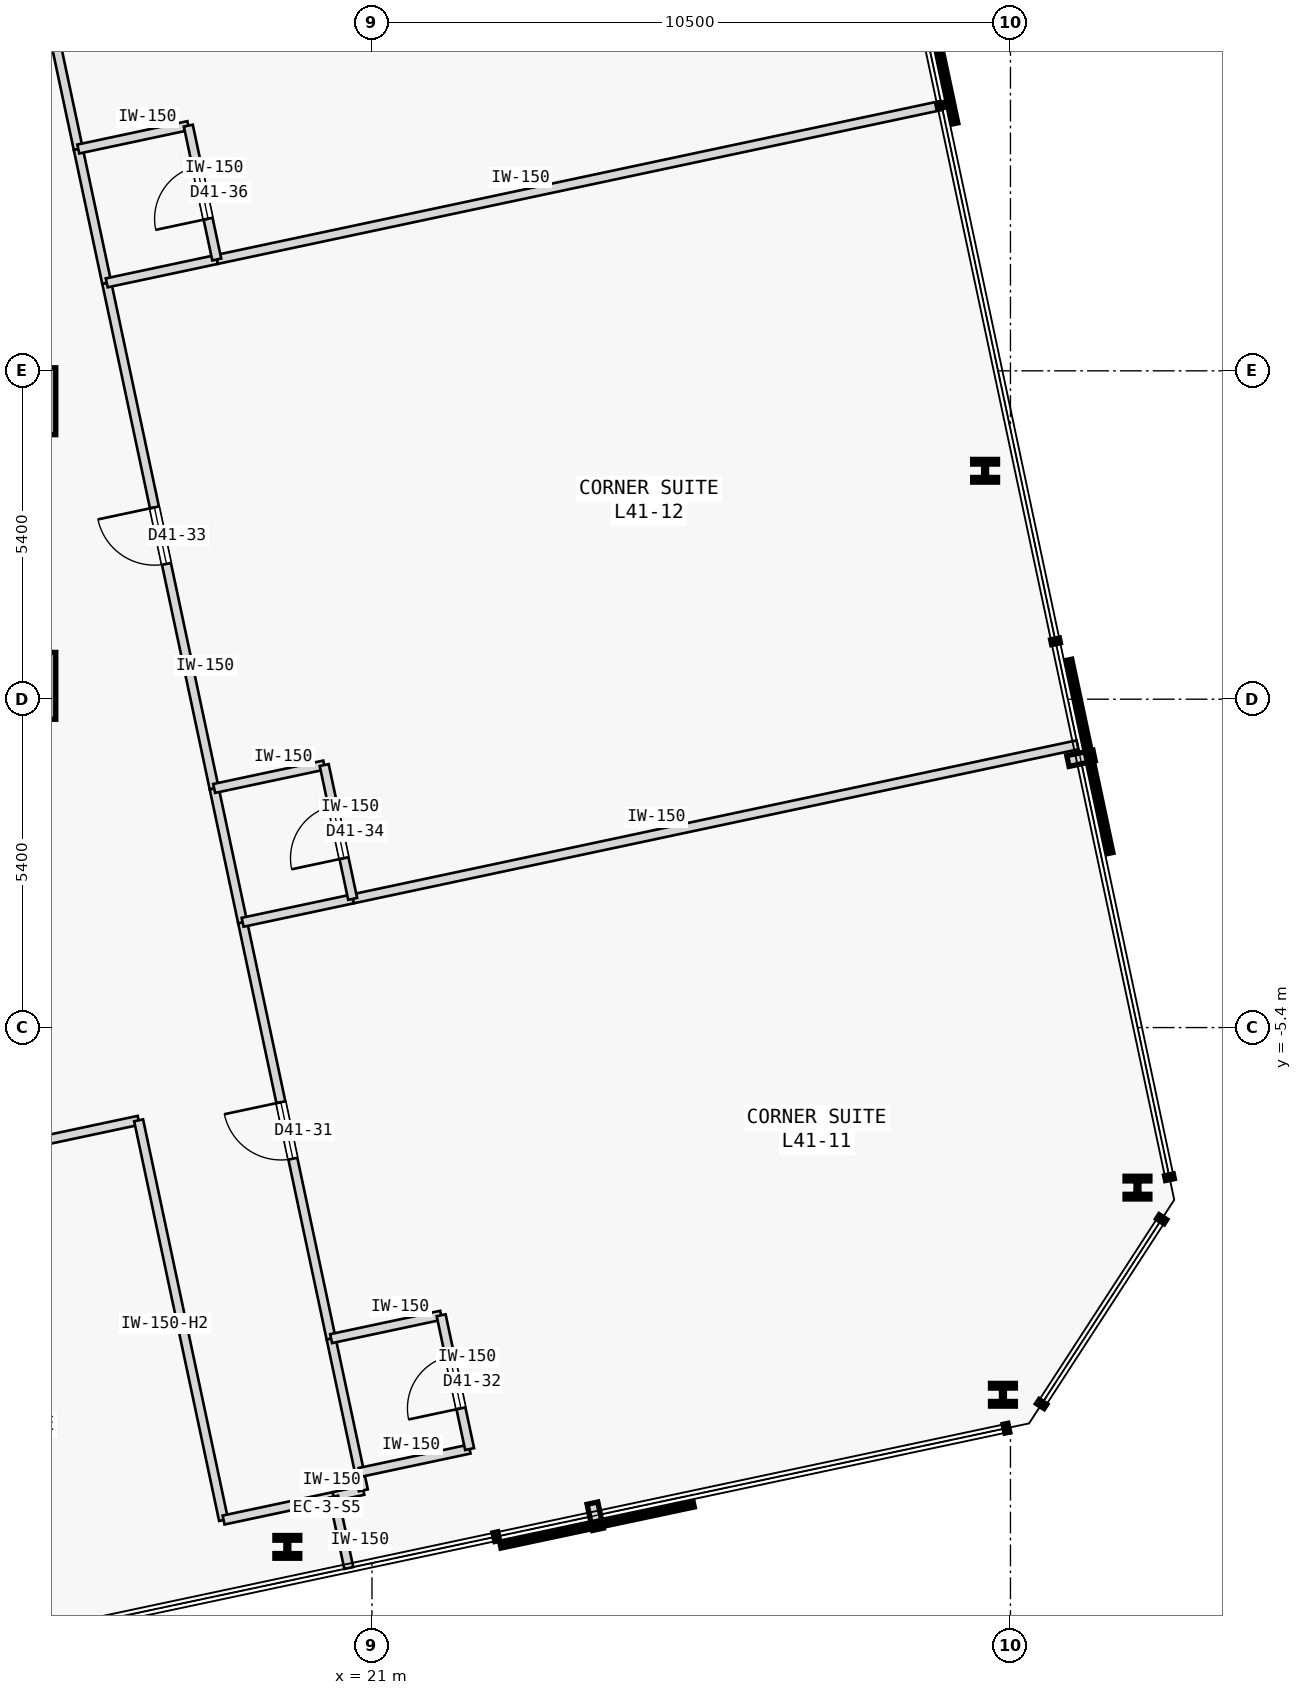
"""IFC4 building model, lengths in metres.
Left out: names, types, materials, properties, quantities, classifications, styles, units other than length and angle.
Written with IfcOpenShell. Run it as: python <this file> out.ifc"""

import sys

from ifc_helpers import new_model, si_unit, direction, frame, frame_2d, origin, origin_2d, place, context, subcontext, project, spatial, rectangle, i_section, extrude, element, fill, save


model = new_model("IFC4")
c1 = context("Model", 3, precision=1e-05, world=origin(), true_north=direction((0.0, 1.0)))
c2 = subcontext(c1, "Body", "Model", "MODEL_VIEW")
j1 = project(units=[si_unit("LENGTHUNIT", "METRE"), si_unit("PLANEANGLEUNIT", "RADIAN")], contexts=[c1])
p1 = place(None, origin())
s1 = spatial("IfcSite", under=j1, at=p1, CompositionType="ELEMENT")
p2 = place(p1, origin())
s2 = spatial("IfcBuilding", under=s1, at=p2, CompositionType="ELEMENT")
p3 = place(p2, frame((0.0, 0.0, 161.6)))
s3 = spatial("IfcBuildingStorey", under=s2, at=p3, CompositionType="ELEMENT", Elevation=161.6)
for number, where, z_axis, x_axis in (
    (1, (15.25, 4.9, 0.0), (0.0, 0.0, 1.0), (1.0, 0.0, 0.0)),
    (2, (15.25, 0.22, 0.0), (0.0, 0.0, 1.0), (1.0, 0.0, 0.0)),
):
    element("IfcColumn", number, at=place(p3, frame(where, z_axis=z_axis, x_axis=x_axis)), inside=s3, PredefinedType="COLUMN", context=c2, shape_type="SweptSolid", body=[
        extrude(rectangle(XDim=1.1, YDim=1.1, at=origin_2d()), origin(), (0.0, 0.0, 1.0), 3.4),
    ])
for number, where, z_axis, x_axis in (
    (3, (19.608, -13.94, 0.0), (0.0, 0.0, 1.0), (1.0, 0.0, 0.0)),
    (4, (31.376, -11.439, 0.0), (0.0, 0.0, 1.0), (1.0, 0.0, 0.0)),
    (5, (33.589, -8.032, 0.0), (0.0, 0.0, 1.0), (1.0, 0.0, 0.0)),
    (6, (31.083, 3.756, 0.0), (0.0, 0.0, 1.0), (1.0, 0.0, 0.0)),
):
    element("IfcColumn", number, at=place(p3, frame(where, z_axis=z_axis, x_axis=x_axis)), inside=s3, PredefinedType="COLUMN", context=c2, shape_type="SweptSolid", body=[
        extrude(i_section(OverallWidth=0.409, OverallDepth=0.374, WebThickness=0.048, FlangeThickness=0.077, FilletRadius=0.015, at=origin_2d()), origin(), (0.0, 0.0, 1.0), 3.4),
    ])
p4 = place(p3, frame((8.964, -8.668, 0.0), z_axis=(0.0, 0.0, 1.0), x_axis=(0.978149300771, 0.20790369261, 0.0)))
e7 = element("IfcWall", 7, at=p4, inside=s3, PredefinedType="PARTITIONING", context=c2, shape_type="SweptSolid", body=[
    extrude(rectangle(XDim=8.382, YDim=0.15, at=frame_2d((4.191, 0.0))), origin(), (0.0, 0.0, 1.0), 3.175),
])
p5 = place(p4, frame((3.731, 0.0, 0.0)))
e8 = element("IfcOpeningElement", 8, at=p5, cuts=e7, PredefinedType="OPENING", context=c2, shape_type="SweptSolid", body=[
    extrude(rectangle(XDim=0.92, YDim=2.15, at=frame_2d((0.46, 1.075))), frame((0.0, 0.085, 0.0), z_axis=(0.0, -1.0, 0.0), x_axis=(1.0, 0.0, 0.0)), (0.0, 0.0, 1.0), 0.17),
])
p6 = place(p3, frame((18.56, -13.498, 0.0), z_axis=(0.0, 0.0, 1.0), x_axis=(-0.207888737749, 0.978152479278, 0.0)))
e9 = element("IfcWall", 9, at=p6, inside=s3, PredefinedType="PARTITIONING", context=c2, shape_type="SweptSolid", body=[
    extrude(rectangle(XDim=6.72, YDim=0.15, at=frame_2d((3.36, 0.0))), origin(), (0.0, 0.0, 1.0), 2.575),
])
p7 = place(p3, frame((18.56, -13.498, 0.0), z_axis=(0.0, 0.0, 1.0), x_axis=(0.978160192495, 0.207852442415, 0.0)))
e10 = element("IfcWall", 10, at=p7, inside=s3, PredefinedType="PARTITIONING", context=c2, shape_type="SweptSolid", body=[
    extrude(rectangle(XDim=1.85, YDim=0.15, at=frame_2d((0.925, 0.0))), origin(), (0.0, 0.0, 1.0), 3.175),
])
p8 = place(p3, frame((20.369, -13.114, 0.0), z_axis=(0.0, 0.0, 1.0), x_axis=(0.978143962546, 0.207928806409, 0.0)))
e11 = element("IfcWall", 11, at=p8, inside=s3, PredefinedType="PARTITIONING", context=c2, shape_type="SweptSolid", body=[
    extrude(rectangle(XDim=0.5, YDim=0.15, at=frame_2d((0.25, 0.0))), origin(), (0.0, 0.0, 1.0), 3.175),
])
p9 = place(p3, frame((20.858, -13.01, 0.0), z_axis=(0.0, 0.0, 1.0), x_axis=(-0.208306395052, 0.978063620518, 0.0)))
e12 = element("IfcWall", 12, at=p9, inside=s3, PredefinedType="PARTITIONING", context=c2, shape_type="SweptSolid", body=[
    extrude(rectangle(XDim=0.3, YDim=0.15, at=frame_2d((0.15, 0.0))), origin(), (0.0, 0.0, 1.0), 3.175),
])
p10 = place(p3, frame((20.328, -10.515, 0.0), z_axis=(0.0, 0.0, 1.0), x_axis=(-0.207906726269, 0.978148655968, 0.0)))
e13 = element("IfcWall", 13, at=p10, inside=s3, PredefinedType="PARTITIONING", context=c2, shape_type="SweptSolid", body=[
    extrude(rectangle(XDim=7.0, YDim=0.15, at=frame_2d((3.5, 0.0))), origin(), (0.0, 0.0, 1.0), 3.175),
])
p11 = place(p10, frame((3.025, 0.0, 0.0)))
e14 = element("IfcOpeningElement", 14, at=p11, cuts=e13, PredefinedType="OPENING", context=c2, shape_type="SweptSolid", body=[
    extrude(rectangle(XDim=0.95, YDim=2.15, at=frame_2d((0.475, 1.075))), frame((0.0, 0.085, 0.0), z_axis=(0.0, -1.0, 0.0), x_axis=(1.0, 0.0, 0.0)), (0.0, 0.0, 1.0), 0.17),
])
p12 = place(p3, frame((20.796, -12.716, 0.0), z_axis=(0.0, 0.0, 1.0), x_axis=(-0.207891197838, 0.978151956427, 0.0)))
e15 = element("IfcWall", 15, at=p12, inside=s3, PredefinedType="PARTITIONING", context=c2, shape_type="SweptSolid", body=[
    extrude(rectangle(XDim=2.25, YDim=0.15, at=frame_2d((1.125, 0.0))), origin(), (0.0, 0.0, 1.0), 3.175),
])
p13 = place(p3, frame((18.405, -1.468, 0.0), z_axis=(0.0, 0.0, 1.0), x_axis=(-0.207888984761, 0.97815242678, 0.0)))
e16 = element("IfcWall", 16, at=p13, inside=s3, PredefinedType="PARTITIONING", context=c2, shape_type="SweptSolid", body=[
    extrude(rectangle(XDim=8.5, YDim=0.15, at=frame_2d((4.25, 0.0))), origin(), (0.0, 0.0, 1.0), 3.175),
])
p14 = place(p13, frame((3.775, 0.0, 0.0)))
e17 = element("IfcOpeningElement", 17, at=p14, cuts=e16, PredefinedType="OPENING", context=c2, shape_type="SweptSolid", body=[
    extrude(rectangle(XDim=0.95, YDim=2.15, at=frame_2d((0.475, 1.075))), frame((0.0, 0.085, 0.0), z_axis=(0.0, -1.0, 0.0), x_axis=(1.0, 0.0, 0.0)), (0.0, 0.0, 1.0), 0.17),
])
p15 = place(p3, frame((18.873, -3.668, 0.0), z_axis=(0.0, 0.0, 1.0), x_axis=(-0.208017083936, 0.9781251928, 0.0)))
e18 = element("IfcWall", 18, at=p15, inside=s3, PredefinedType="PARTITIONING", context=c2, shape_type="SweptSolid", body=[
    extrude(rectangle(XDim=2.25, YDim=0.15, at=frame_2d((1.125, 0.0))), origin(), (0.0, 0.0, 1.0), 3.175),
])
p16 = place(p3, frame((16.17, 9.047, 0.0), z_axis=(0.0, 0.0, 1.0), x_axis=(-0.2079164651, 0.978146585917, 0.0)))
e19 = element("IfcWall", 19, at=p16, inside=s3, PredefinedType="PARTITIONING", context=c2, shape_type="SweptSolid", body=[
    extrude(rectangle(XDim=8.5, YDim=0.15, at=frame_2d((4.25, 0.0))), origin(), (0.0, 0.0, 1.0), 3.175),
])
p17 = place(p16, frame((3.775, 0.0, 0.0)))
e20 = element("IfcOpeningElement", 20, at=p17, cuts=e19, PredefinedType="OPENING", context=c2, shape_type="SweptSolid", body=[
    extrude(rectangle(XDim=0.95, YDim=2.15, at=frame_2d((0.475, 1.075))), frame((0.0, 0.085, 0.0), z_axis=(0.0, -1.0, 0.0), x_axis=(1.0, 0.0, 0.0)), (0.0, 0.0, 1.0), 0.17),
])
p18 = place(p3, frame((16.638, 6.847, 0.0), z_axis=(0.0, 0.0, 1.0), x_axis=(-0.207913264065, 0.978147266328, 0.0)))
e21 = element("IfcWall", 21, at=p18, inside=s3, PredefinedType="PARTITIONING", context=c2, shape_type="SweptSolid", body=[
    extrude(rectangle(XDim=2.25, YDim=0.15, at=frame_2d((1.125, 0.0))), origin(), (0.0, 0.0, 1.0), 3.175),
])
p19 = place(p3, frame((20.619, -14.288, 0.0), z_axis=(0.0, 0.0, 1.0), x_axis=(-0.207917150959, 0.978146440129, 0.0)))
e22 = element("IfcWall", 22, at=p19, inside=s3, PredefinedType="PARTITIONING", context=c2, shape_type="SweptSolid", body=[
    extrude(rectangle(XDim=1.2, YDim=0.15, at=frame_2d((0.6, 0.0))), origin(), (0.0, 0.0, 1.0), 3.175),
])
for number, where, z_axis, x_axis in (
    (23, (20.796, -12.716, 0.0), (0.0, 0.0, 1.0), (0.978, 0.208, 0.0)),
    (24, (20.328, -10.515, 0.0), (0.0, 0.0, 1.0), (0.978, 0.208, 0.0)),
):
    element("IfcWall", number, at=place(p3, frame(where, z_axis=z_axis, x_axis=x_axis)), inside=s3, PredefinedType="PARTITIONING", context=c2, shape_type="SweptSolid", body=[
        extrude(rectangle(XDim=1.85, YDim=0.15, at=frame_2d((0.925, 0.0))), origin(), (0.0, 0.0, 1.0), 3.175),
    ])
p20 = place(p3, frame((22.605, -12.332, 0.0), z_axis=(0.0, 0.0, 1.0), x_axis=(-0.207891197838, 0.978151956427, 0.0)))
e25 = element("IfcWall", 25, at=p20, inside=s3, PredefinedType="PARTITIONING", context=c2, shape_type="SweptSolid", body=[
    extrude(rectangle(XDim=2.25, YDim=0.15, at=frame_2d((1.125, 0.0))), origin(), (0.0, 0.0, 1.0), 3.175),
])
p21 = place(p20, frame((0.685, 0.0, 0.0)))
e26 = element("IfcOpeningElement", 26, at=p21, cuts=e25, PredefinedType="OPENING", context=c2, shape_type="SweptSolid", body=[
    extrude(rectangle(XDim=0.88, YDim=2.15, at=frame_2d((0.44, 1.075))), frame((0.0, 0.085, 0.0), z_axis=(0.0, -1.0, 0.0), x_axis=(1.0, 0.0, 0.0)), (0.0, 0.0, 1.0), 0.17),
])
p22 = place(p3, frame((20.682, -3.284, 0.0), z_axis=(0.0, 0.0, 1.0), x_axis=(0.97814556055, 0.207921288896, 0.0)))
e27 = element("IfcWall", 27, at=p22, inside=s3, PredefinedType="PARTITIONING", context=c2, shape_type="SweptSolid", body=[
    extrude(rectangle(XDim=12.187, YDim=0.15, at=frame_2d((6.094, 0.0))), origin(), (0.0, 0.0, 1.0), 3.175),
])
p23 = place(p3, frame((18.873, -3.668, 0.0), z_axis=(0.0, 0.0, 1.0), x_axis=(0.978160192495, 0.207852442415, 0.0)))
e28 = element("IfcWall", 28, at=p23, inside=s3, PredefinedType="PARTITIONING", context=c2, shape_type="SweptSolid", body=[
    extrude(rectangle(XDim=1.85, YDim=0.15, at=frame_2d((0.925, 0.0))), origin(), (0.0, 0.0, 1.0), 3.175),
])
p24 = place(p3, frame((18.405, -1.468, 0.0), z_axis=(0.0, 0.0, 1.0), x_axis=(0.978139061018, 0.207951862966, 0.0)))
e29 = element("IfcWall", 29, at=p24, inside=s3, PredefinedType="PARTITIONING", context=c2, shape_type="SweptSolid", body=[
    extrude(rectangle(XDim=1.85, YDim=0.15, at=frame_2d((0.925, 0.0))), origin(), (0.0, 0.0, 1.0), 3.175),
])
p25 = place(p3, frame((20.682, -3.284, 0.0), z_axis=(0.0, 0.0, 1.0), x_axis=(-0.207891197838, 0.978151956427, 0.0)))
e30 = element("IfcWall", 30, at=p25, inside=s3, PredefinedType="PARTITIONING", context=c2, shape_type="SweptSolid", body=[
    extrude(rectangle(XDim=2.25, YDim=0.15, at=frame_2d((1.125, 0.0))), origin(), (0.0, 0.0, 1.0), 3.175),
])
p26 = place(p25, frame((0.685, 0.0, 0.0)))
e31 = element("IfcOpeningElement", 31, at=p26, cuts=e30, PredefinedType="OPENING", context=c2, shape_type="SweptSolid", body=[
    extrude(rectangle(XDim=0.88, YDim=2.15, at=frame_2d((0.44, 1.075))), frame((0.0, 0.085, 0.0), z_axis=(0.0, -1.0, 0.0), x_axis=(1.0, 0.0, 0.0)), (0.0, 0.0, 1.0), 0.17),
])
p27 = place(p3, frame((18.447, 7.231, 0.0), z_axis=(0.0, 0.0, 1.0), x_axis=(0.978149634612, 0.207902121941, 0.0)))
e32 = element("IfcWall", 32, at=p27, inside=s3, PredefinedType="PARTITIONING", context=c2, shape_type="SweptSolid", body=[
    extrude(rectangle(XDim=12.187, YDim=0.15, at=frame_2d((6.094, 0.0))), origin(), (0.0, 0.0, 1.0), 3.175),
])
p28 = place(p3, frame((16.638, 6.847, 0.0), z_axis=(0.0, 0.0, 1.0), x_axis=(0.978160192495, 0.207852442415, 0.0)))
e33 = element("IfcWall", 33, at=p28, inside=s3, PredefinedType="PARTITIONING", context=c2, shape_type="SweptSolid", body=[
    extrude(rectangle(XDim=1.85, YDim=0.15, at=frame_2d((0.925, 0.0))), origin(), (0.0, 0.0, 1.0), 3.175),
])
p29 = place(p3, frame((16.17, 9.047, 0.0), z_axis=(0.0, 0.0, 1.0), x_axis=(0.978133353907, 0.20797870558, 0.0)))
e34 = element("IfcWall", 34, at=p29, inside=s3, PredefinedType="PARTITIONING", context=c2, shape_type="SweptSolid", body=[
    extrude(rectangle(XDim=1.85, YDim=0.15, at=frame_2d((0.925, 0.0))), origin(), (0.0, 0.0, 1.0), 3.175),
])
p30 = place(p3, frame((18.447, 7.231, 0.0), z_axis=(0.0, 0.0, 1.0), x_axis=(-0.207891197838, 0.978151956427, 0.0)))
e35 = element("IfcWall", 35, at=p30, inside=s3, PredefinedType="PARTITIONING", context=c2, shape_type="SweptSolid", body=[
    extrude(rectangle(XDim=2.25, YDim=0.15, at=frame_2d((1.125, 0.0))), origin(), (0.0, 0.0, 1.0), 3.175),
])
p31 = place(p30, frame((0.685, 0.0, 0.0)))
e36 = element("IfcOpeningElement", 36, at=p31, cuts=e35, PredefinedType="OPENING", context=c2, shape_type="SweptSolid", body=[
    extrude(rectangle(XDim=0.88, YDim=2.15, at=frame_2d((0.44, 1.075))), frame((0.0, 0.085, 0.0), z_axis=(0.0, -1.0, 0.0), x_axis=(1.0, 0.0, 0.0)), (0.0, 0.0, 1.0), 0.17),
])
p32 = place(p11, origin())
e37 = element("IfcDoor", 37, at=p32, inside=s3, OperationType="SINGLE_SWING_RIGHT", PredefinedType="DOOR", context=c2, shape_type="SweptSolid", body=[
    extrude(rectangle(XDim=0.95, YDim=2.15, at=frame_2d((0.475, 1.075))), frame((0.0, 0.025, 0.0), z_axis=(0.0, -1.0, 0.0), x_axis=(1.0, 0.0, 0.0)), (0.0, 0.0, 1.0), 0.05),
])
fill(e14, e37)
p33 = place(p21, origin())
e38 = element("IfcDoor", 38, at=p33, inside=s3, OperationType="SINGLE_SWING_LEFT", PredefinedType="DOOR", context=c2, shape_type="SweptSolid", body=[
    extrude(rectangle(XDim=0.88, YDim=2.15, at=frame_2d((0.44, 1.075))), frame((0.0, 0.025, 0.0), z_axis=(0.0, -1.0, 0.0), x_axis=(1.0, 0.0, 0.0)), (0.0, 0.0, 1.0), 0.05),
])
fill(e26, e38)
p34 = place(p14, origin())
e39 = element("IfcDoor", 39, at=p34, inside=s3, OperationType="SINGLE_SWING_RIGHT", PredefinedType="DOOR", context=c2, shape_type="SweptSolid", body=[
    extrude(rectangle(XDim=0.95, YDim=2.15, at=frame_2d((0.475, 1.075))), frame((0.0, 0.025, 0.0), z_axis=(0.0, -1.0, 0.0), x_axis=(1.0, 0.0, 0.0)), (0.0, 0.0, 1.0), 0.05),
])
fill(e17, e39)
p35 = place(p26, origin())
e40 = element("IfcDoor", 40, at=p35, inside=s3, OperationType="SINGLE_SWING_LEFT", PredefinedType="DOOR", context=c2, shape_type="SweptSolid", body=[
    extrude(rectangle(XDim=0.88, YDim=2.15, at=frame_2d((0.44, 1.075))), frame((0.0, 0.025, 0.0), z_axis=(0.0, -1.0, 0.0), x_axis=(1.0, 0.0, 0.0)), (0.0, 0.0, 1.0), 0.05),
])
fill(e31, e40)
p36 = place(p31, origin())
e41 = element("IfcDoor", 41, at=p36, inside=s3, OperationType="SINGLE_SWING_LEFT", PredefinedType="DOOR", context=c2, shape_type="SweptSolid", body=[
    extrude(rectangle(XDim=0.88, YDim=2.15, at=frame_2d((0.44, 1.075))), frame((0.0, 0.025, 0.0), z_axis=(0.0, -1.0, 0.0), x_axis=(1.0, 0.0, 0.0)), (0.0, 0.0, 1.0), 0.05),
])
fill(e36, e41)
save(model, sys.argv[1])
